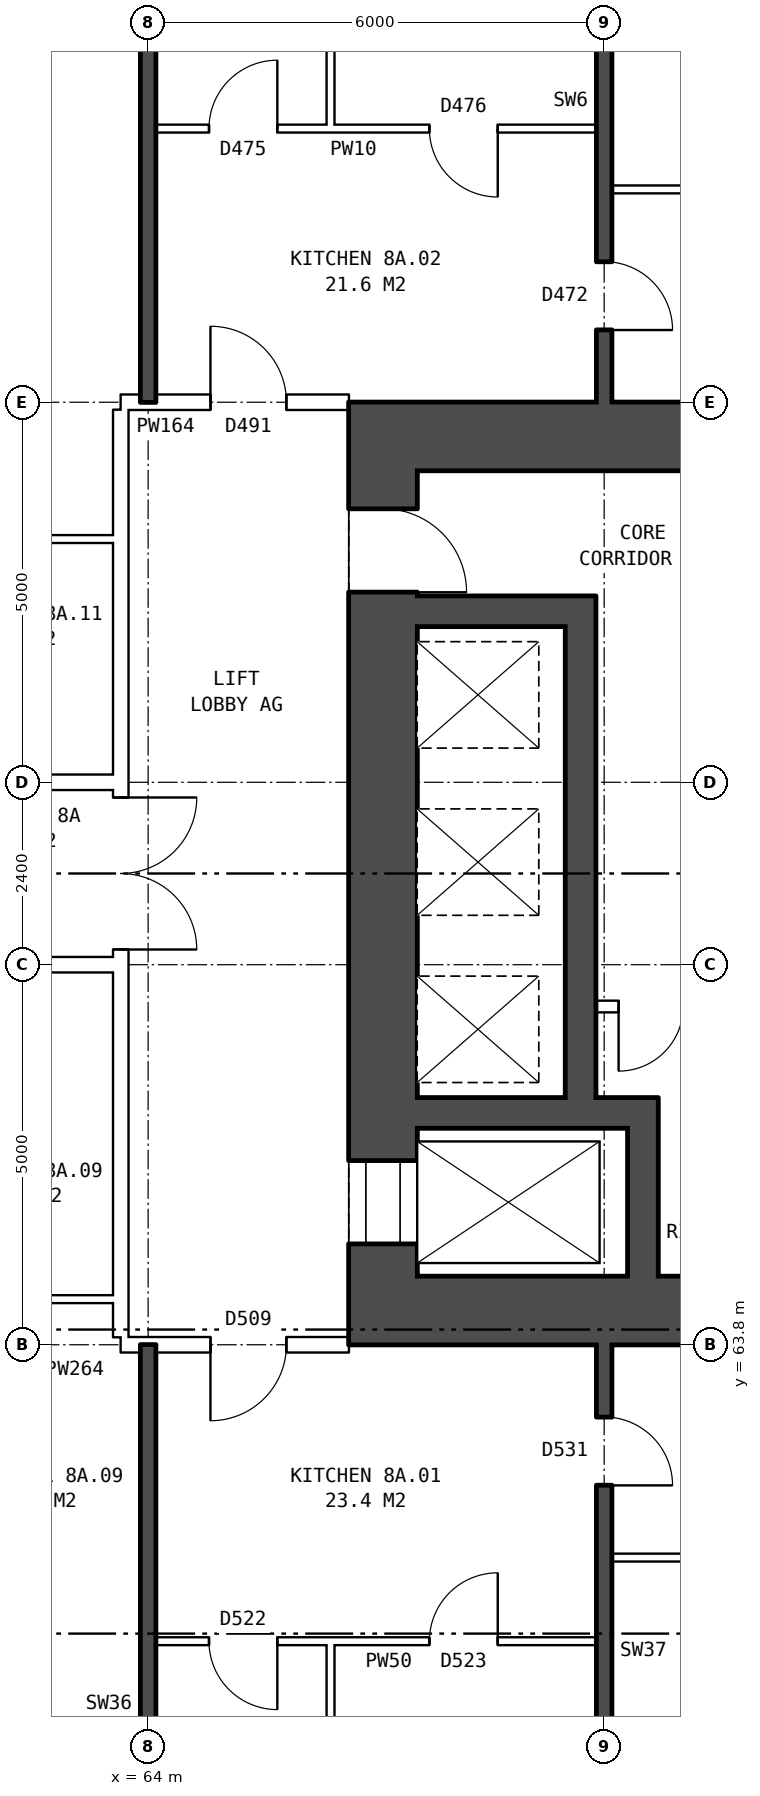
"""IFC4 building model, lengths in metres.
Left out: names, types, materials, properties, quantities, classifications, styles, units other than length and angle.
Written with IfcOpenShell. Run it as: python <this file> out.ifc"""

import sys

from ifc_helpers import new_model, si_unit, direction, frame, frame_2d, origin, place, context, subcontext, project, spatial, rectangle, extrude, element, fill, save


model = new_model("IFC4")
c1 = context("Model", 3, precision=1e-05, world=origin(), true_north=direction((0.0, 1.0)))
c2 = subcontext(c1, "Body", "Model", "MODEL_VIEW")
j1 = project(units=[si_unit("LENGTHUNIT", "METRE"), si_unit("PLANEANGLEUNIT", "RADIAN")], contexts=[c1])
p1 = place(None, origin())
s1 = spatial("IfcSite", under=j1, at=p1, CompositionType="ELEMENT")
p2 = place(p1, origin())
s2 = spatial("IfcBuilding", under=s1, at=p2, CompositionType="ELEMENT")
p3 = place(p2, frame((0.0, 0.0, 31.9)))
s3 = spatial("IfcBuildingStorey", under=s2, at=p3, CompositionType="ELEMENT", Elevation=31.9)
p4 = place(p3, frame((67.09, 64.7, 0.0), z_axis=(0.0, 0.0, 1.0), x_axis=(0.0, 1.0, 0.0)))
e1 = element("IfcWall", 1, at=p4, inside=s3, PredefinedType="SHEAR", context=c2, shape_type="SweptSolid", body=[
    extrude(rectangle(XDim=10.6, YDim=0.9, at=frame_2d((5.3, 0.0))), origin(), (0.0, 0.0, 1.0), 2.85),
])
p5 = place(p4, frame((0.425, 0.0, 0.0)))
e2 = element("IfcOpeningElement", 2, at=p5, cuts=e1, PredefinedType="OPENING", context=c2, shape_type="SweptSolid", body=[
    extrude(rectangle(XDim=1.1, YDim=2.1, at=frame_2d((0.55, 1.05))), frame((0.0, 0.46, 0.0), z_axis=(0.0, -1.0, 0.0), x_axis=(1.0, 0.0, 0.0)), (0.0, 0.0, 1.0), 0.92),
])
p6 = place(p4, frame((9.0, 0.0, 0.0)))
e3 = element("IfcOpeningElement", 3, at=p6, cuts=e1, PredefinedType="OPENING", context=c2, shape_type="SweptSolid", body=[
    extrude(rectangle(XDim=1.1, YDim=2.1, at=frame_2d((0.55, 1.05))), frame((0.0, 0.46, 0.0), z_axis=(0.0, -1.0, 0.0), x_axis=(1.0, 0.0, 0.0)), (0.0, 0.0, 1.0), 0.92),
])
for number, where, z_axis, x_axis in (
    (4, (66.64, 64.25, 0.0), (0.0, 0.0, 1.0), (1.0, 0.0, 0.0)),
    (5, (66.64, 75.75, 0.0), (0.0, 0.0, 1.0), (1.0, 0.0, 0.0)),
):
    element("IfcWall", number, at=place(p3, frame(where, z_axis=z_axis, x_axis=x_axis)), inside=s3, PredefinedType="SHEAR", context=c2, shape_type="SweptSolid", body=[
        extrude(rectangle(XDim=9.0, YDim=0.9, at=frame_2d((4.5, 0.0))), origin(), (0.0, 0.0, 1.0), 2.85),
    ])
p7 = place(p3, frame((67.54, 66.85, 0.0), z_axis=(0.0, 0.0, 1.0), x_axis=(1.0, 0.0, 0.0)))
e6 = element("IfcWall", 6, at=p7, inside=s3, PredefinedType="SHEAR", context=c2, shape_type="SweptSolid", body=[
    extrude(rectangle(XDim=3.17, YDim=0.4, at=frame_2d((1.585, 0.0))), origin(), (0.0, 0.0, 1.0), 2.85),
])
p8 = place(p3, frame((69.89, 68.25, 0.0), z_axis=(0.0, 0.0, 1.0), x_axis=(1.0, 0.0, 0.0)))
e7 = element("IfcWall", 7, at=p8, inside=s3, PredefinedType="PARTITIONING", context=c2, shape_type="SweptSolid", body=[
    extrude(rectangle(XDim=1.45, YDim=0.15, at=frame_2d((0.725, 0.0))), origin(), (0.0, 0.0, 1.0), 2.85),
])
p9 = place(p8, frame((0.3, 0.0, 0.0)))
e8 = element("IfcOpeningElement", 8, at=p9, cuts=e7, PredefinedType="OPENING", context=c2, shape_type="SweptSolid", body=[
    extrude(rectangle(XDim=0.85, YDim=2.1, at=frame_2d((0.425, 1.05))), frame((0.0, 0.085, 0.0), z_axis=(0.0, -1.0, 0.0), x_axis=(1.0, 0.0, 0.0)), (0.0, 0.0, 1.0), 0.17),
])
p10 = place(p3, frame((67.54, 73.45, 0.0), z_axis=(0.0, 0.0, 1.0), x_axis=(1.0, 0.0, 0.0)))
e9 = element("IfcWall", 9, at=p10, inside=s3, PredefinedType="SHEAR", context=c2, shape_type="SweptSolid", body=[
    extrude(rectangle(XDim=1.95, YDim=0.4, at=frame_2d((0.975, 0.0))), origin(), (0.0, 0.0, 1.0), 2.85),
])
p11 = place(p3, frame((69.69, 67.05, 0.0), z_axis=(0.0, 0.0, 1.0), x_axis=(0.0, 1.0, 0.0)))
e10 = element("IfcWall", 10, at=p11, inside=s3, PredefinedType="SHEAR", context=c2, shape_type="SweptSolid", body=[
    extrude(rectangle(XDim=6.6, YDim=0.4, at=frame_2d((3.3, 0.0))), origin(), (0.0, 0.0, 1.0), 2.85),
])
p12 = place(p3, frame((70.51, 64.7, 0.0), z_axis=(0.0, 0.0, 1.0), x_axis=(0.0, 1.0, 0.0)))
e11 = element("IfcWall", 11, at=p12, inside=s3, PredefinedType="SHEAR", context=c2, shape_type="SweptSolid", body=[
    extrude(rectangle(XDim=1.95, YDim=0.4, at=frame_2d((0.975, 0.0))), origin(), (0.0, 0.0, 1.0), 2.85),
])
p13 = place(p3, frame((63.64, 63.9, 0.0), z_axis=(0.0, 0.0, 1.0), x_axis=(0.0, 1.0, 0.0)))
e12 = element("IfcWall", 12, at=p13, inside=s3, PredefinedType="PARTITIONING", context=c2, shape_type="SweptSolid", body=[
    extrude(rectangle(XDim=12.2, YDim=0.2, at=frame_2d((6.1, 0.0))), origin(), (0.0, 0.0, 1.0), 2.85),
])
p14 = place(p13, frame((5.1, 0.0, 0.0)))
e13 = element("IfcOpeningElement", 13, at=p14, cuts=e12, PredefinedType="OPENING", context=c2, shape_type="SweptSolid", body=[
    extrude(rectangle(XDim=2.0, YDim=2.1, at=frame_2d((1.0, 1.05))), frame((0.0, 0.11, 0.0), z_axis=(0.0, -1.0, 0.0), x_axis=(1.0, 0.0, 0.0)), (0.0, 0.0, 1.0), 0.22),
])
p15 = place(p3, frame((64.1, 59.9, 0.0), z_axis=(0.0, 0.0, 1.0), x_axis=(1.0, 0.0, 0.0)))
e14 = element("IfcWall", 14, at=p15, inside=s3, PredefinedType="PARTITIONING", context=c2, shape_type="SweptSolid", body=[
    extrude(rectangle(XDim=5.8, YDim=0.1, at=frame_2d((2.9, 0.0))), origin(), (0.0, 0.0, 1.0), 2.85),
])
p16 = place(p15, frame((3.6, 0.0, 0.0)))
e15 = element("IfcOpeningElement", 15, at=p16, cuts=e14, PredefinedType="OPENING", context=c2, shape_type="SweptSolid", body=[
    extrude(rectangle(XDim=0.9, YDim=2.1, at=frame_2d((0.45, 1.05))), frame((0.0, 0.06, 0.0), z_axis=(0.0, -1.0, 0.0), x_axis=(1.0, 0.0, 0.0)), (0.0, 0.0, 1.0), 0.12),
])
p17 = place(p15, frame((0.7, 0.0, 0.0)))
e16 = element("IfcOpeningElement", 16, at=p17, cuts=e14, PredefinedType="OPENING", context=c2, shape_type="SweptSolid", body=[
    extrude(rectangle(XDim=0.9, YDim=2.1, at=frame_2d((0.45, 1.05))), frame((0.0, 0.06, 0.0), z_axis=(0.0, -1.0, 0.0), x_axis=(1.0, 0.0, 0.0)), (0.0, 0.0, 1.0), 0.12),
])
p18 = place(p3, frame((70.1, 61.0, 0.0), z_axis=(0.0, 0.0, 1.0), x_axis=(1.0, 0.0, 0.0)))
e17 = element("IfcWall", 17, at=p18, inside=s3, PredefinedType="PARTITIONING", context=c2, shape_type="SweptSolid", body=[
    extrude(rectangle(XDim=5.54, YDim=0.1, at=frame_2d((2.77, 0.0))), origin(), (0.0, 0.0, 1.0), 2.85),
])
p19 = place(p3, frame((63.64, 63.8, 0.0), z_axis=(0.0, 0.0, 1.0), x_axis=(1.0, 0.0, 0.0)))
e18 = element("IfcWall", 18, at=p19, inside=s3, PredefinedType="PARTITIONING", context=c2, shape_type="SweptSolid", body=[
    extrude(rectangle(XDim=3.0, YDim=0.2, at=frame_2d((1.5, 0.0))), origin(), (0.0, 0.0, 1.0), 2.85),
])
p20 = place(p19, frame((1.18, 0.0, 0.0)))
e19 = element("IfcOpeningElement", 19, at=p20, cuts=e18, PredefinedType="OPENING", context=c2, shape_type="SweptSolid", body=[
    extrude(rectangle(XDim=1.0, YDim=2.1, at=frame_2d((0.5, 1.05))), frame((0.0, 0.11, 0.0), z_axis=(0.0, -1.0, 0.0), x_axis=(1.0, 0.0, 0.0)), (0.0, 0.0, 1.0), 0.22),
])
p21 = place(p3, frame((61.0, 64.4, 0.0), z_axis=(0.0, 0.0, 1.0), x_axis=(1.0, 0.0, 0.0)))
e20 = element("IfcWall", 20, at=p21, inside=s3, PredefinedType="PARTITIONING", context=c2, shape_type="SweptSolid", body=[
    extrude(rectangle(XDim=2.64, YDim=0.1, at=frame_2d((1.32, 0.0))), origin(), (0.0, 0.0, 1.0), 2.85),
])
p22 = place(p3, frame((44.36, 68.8, 0.0), z_axis=(0.0, 0.0, 1.0), x_axis=(1.0, 0.0, 0.0)))
e21 = element("IfcWall", 21, at=p22, inside=s3, PredefinedType="PARTITIONING", context=c2, shape_type="SweptSolid", body=[
    extrude(rectangle(XDim=19.28, YDim=0.2, at=frame_2d((9.64, 0.0))), origin(), (0.0, 0.0, 1.0), 2.85),
])
p23 = place(p22, frame((14.64, 0.0, 0.0)))
e22 = element("IfcOpeningElement", 22, at=p23, cuts=e21, PredefinedType="OPENING", context=c2, shape_type="SweptSolid", body=[
    extrude(rectangle(XDim=1.0, YDim=2.1, at=frame_2d((0.5, 1.05))), frame((0.0, 0.11, 0.0), z_axis=(0.0, -1.0, 0.0), x_axis=(1.0, 0.0, 0.0)), (0.0, 0.0, 1.0), 0.22),
])
p24 = place(p22, frame((5.64, 0.0, 0.0)))
e23 = element("IfcOpeningElement", 23, at=p24, cuts=e21, PredefinedType="OPENING", context=c2, shape_type="SweptSolid", body=[
    extrude(rectangle(XDim=1.0, YDim=2.1, at=frame_2d((0.5, 1.05))), frame((0.0, 0.11, 0.0), z_axis=(0.0, -1.0, 0.0), x_axis=(1.0, 0.0, 0.0)), (0.0, 0.0, 1.0), 0.22),
])
p25 = place(p3, frame((44.36, 71.2, 0.0), z_axis=(0.0, 0.0, 1.0), x_axis=(1.0, 0.0, 0.0)))
e24 = element("IfcWall", 24, at=p25, inside=s3, PredefinedType="PARTITIONING", context=c2, shape_type="SweptSolid", body=[
    extrude(rectangle(XDim=19.28, YDim=0.2, at=frame_2d((9.64, 0.0))), origin(), (0.0, 0.0, 1.0), 2.85),
])
p26 = place(p25, frame((14.64, 0.0, 0.0)))
e25 = element("IfcOpeningElement", 25, at=p26, cuts=e24, PredefinedType="OPENING", context=c2, shape_type="SweptSolid", body=[
    extrude(rectangle(XDim=1.0, YDim=2.1, at=frame_2d((0.5, 1.05))), frame((0.0, 0.11, 0.0), z_axis=(0.0, -1.0, 0.0), x_axis=(1.0, 0.0, 0.0)), (0.0, 0.0, 1.0), 0.22),
])
p27 = place(p25, frame((5.64, 0.0, 0.0)))
e26 = element("IfcOpeningElement", 26, at=p27, cuts=e24, PredefinedType="OPENING", context=c2, shape_type="SweptSolid", body=[
    extrude(rectangle(XDim=1.0, YDim=2.1, at=frame_2d((0.5, 1.05))), frame((0.0, 0.11, 0.0), z_axis=(0.0, -1.0, 0.0), x_axis=(1.0, 0.0, 0.0)), (0.0, 0.0, 1.0), 0.22),
])
p28 = place(p3, frame((61.0, 74.4, 0.0), z_axis=(0.0, 0.0, 1.0), x_axis=(1.0, 0.0, 0.0)))
e27 = element("IfcWall", 27, at=p28, inside=s3, PredefinedType="PARTITIONING", context=c2, shape_type="SweptSolid", body=[
    extrude(rectangle(XDim=2.64, YDim=0.1, at=frame_2d((1.32, 0.0))), origin(), (0.0, 0.0, 1.0), 2.85),
])
p29 = place(p3, frame((63.64, 76.2, 0.0), z_axis=(0.0, 0.0, 1.0), x_axis=(1.0, 0.0, 0.0)))
e28 = element("IfcWall", 28, at=p29, inside=s3, PredefinedType="PARTITIONING", context=c2, shape_type="SweptSolid", body=[
    extrude(rectangle(XDim=3.0, YDim=0.2, at=frame_2d((1.5, 0.0))), origin(), (0.0, 0.0, 1.0), 2.85),
])
p30 = place(p29, frame((1.18, 0.0, 0.0)))
e29 = element("IfcOpeningElement", 29, at=p30, cuts=e28, PredefinedType="OPENING", context=c2, shape_type="SweptSolid", body=[
    extrude(rectangle(XDim=1.0, YDim=2.1, at=frame_2d((0.5, 1.05))), frame((0.0, 0.11, 0.0), z_axis=(0.0, -1.0, 0.0), x_axis=(1.0, 0.0, 0.0)), (0.0, 0.0, 1.0), 0.22),
])
p31 = place(p3, frame((70.1, 79.0, 0.0), z_axis=(0.0, 0.0, 1.0), x_axis=(1.0, 0.0, 0.0)))
e30 = element("IfcWall", 30, at=p31, inside=s3, PredefinedType="PARTITIONING", context=c2, shape_type="SweptSolid", body=[
    extrude(rectangle(XDim=5.54, YDim=0.1, at=frame_2d((2.77, 0.0))), origin(), (0.0, 0.0, 1.0), 2.85),
])
p32 = place(p3, frame((64.1, 79.8, 0.0), z_axis=(0.0, 0.0, 1.0), x_axis=(1.0, 0.0, 0.0)))
e31 = element("IfcWall", 31, at=p32, inside=s3, PredefinedType="PARTITIONING", context=c2, shape_type="SweptSolid", body=[
    extrude(rectangle(XDim=5.8, YDim=0.1, at=frame_2d((2.9, 0.0))), origin(), (0.0, 0.0, 1.0), 2.85),
])
p33 = place(p32, frame((3.6, 0.0, 0.0)))
e32 = element("IfcOpeningElement", 32, at=p33, cuts=e31, PredefinedType="OPENING", context=c2, shape_type="SweptSolid", body=[
    extrude(rectangle(XDim=0.9, YDim=2.1, at=frame_2d((0.45, 1.05))), frame((0.0, 0.06, 0.0), z_axis=(0.0, -1.0, 0.0), x_axis=(1.0, 0.0, 0.0)), (0.0, 0.0, 1.0), 0.12),
])
p34 = place(p32, frame((0.7, 0.0, 0.0)))
e33 = element("IfcOpeningElement", 33, at=p34, cuts=e31, PredefinedType="OPENING", context=c2, shape_type="SweptSolid", body=[
    extrude(rectangle(XDim=0.9, YDim=2.1, at=frame_2d((0.45, 1.05))), frame((0.0, 0.06, 0.0), z_axis=(0.0, -1.0, 0.0), x_axis=(1.0, 0.0, 0.0)), (0.0, 0.0, 1.0), 0.12),
])
for number, where, z_axis, x_axis in (
    (34, (64.0, 54.36, 0.0), (0.0, 0.0, 1.0), (0.0, 1.0, 0.0)),
    (35, (64.0, 76.2, 0.0), (0.0, 0.0, 1.0), (0.0, 1.0, 0.0)),
):
    element("IfcWall", number, at=place(p3, frame(where, z_axis=z_axis, x_axis=x_axis)), inside=s3, PredefinedType="SOLIDWALL", context=c2, shape_type="SweptSolid", body=[
        extrude(rectangle(XDim=9.44, YDim=0.2, at=frame_2d((4.72, 0.0))), origin(), (0.0, 0.0, 1.0), 2.85),
    ])
p35 = place(p3, frame((66.4, 57.45, 0.0), z_axis=(0.0, 0.0, 1.0), x_axis=(0.0, 1.0, 0.0)))
e36 = element("IfcWall", 36, at=p35, inside=s3, PredefinedType="PARTITIONING", context=c2, shape_type="SweptSolid", body=[
    extrude(rectangle(XDim=2.4, YDim=0.1, at=frame_2d((1.2, 0.0))), origin(), (0.0, 0.0, 1.0), 2.85),
])
p36 = place(p3, frame((66.4, 79.85, 0.0), z_axis=(0.0, 0.0, 1.0), x_axis=(0.0, 1.0, 0.0)))
e37 = element("IfcWall", 37, at=p36, inside=s3, PredefinedType="PARTITIONING", context=c2, shape_type="SweptSolid", body=[
    extrude(rectangle(XDim=2.3, YDim=0.1, at=frame_2d((1.15, 0.0))), origin(), (0.0, 0.0, 1.0), 2.85),
])
p37 = place(p3, frame((70.0, 54.36, 0.0), z_axis=(0.0, 0.0, 1.0), x_axis=(0.0, 1.0, 0.0)))
e38 = element("IfcWall", 38, at=p37, inside=s3, PredefinedType="SOLIDWALL", context=c2, shape_type="SweptSolid", body=[
    extrude(rectangle(XDim=9.44, YDim=0.2, at=frame_2d((4.72, 0.0))), origin(), (0.0, 0.0, 1.0), 2.85),
])
p38 = place(p37, frame((2.32, 0.0, 0.0)))
e39 = element("IfcOpeningElement", 39, at=p38, cuts=e38, PredefinedType="OPENING", context=c2, shape_type="SweptSolid", body=[
    extrude(rectangle(XDim=0.9, YDim=2.1, at=frame_2d((0.45, 1.05))), frame((0.0, 0.11, 0.0), z_axis=(0.0, -1.0, 0.0), x_axis=(1.0, 0.0, 0.0)), (0.0, 0.0, 1.0), 0.22),
])
p39 = place(p37, frame((7.59, 0.0, 0.0)))
e40 = element("IfcOpeningElement", 40, at=p39, cuts=e38, PredefinedType="OPENING", context=c2, shape_type="SweptSolid", body=[
    extrude(rectangle(XDim=0.9, YDim=2.1, at=frame_2d((0.45, 1.05))), frame((0.0, 0.11, 0.0), z_axis=(0.0, -1.0, 0.0), x_axis=(1.0, 0.0, 0.0)), (0.0, 0.0, 1.0), 0.22),
])
p40 = place(p3, frame((70.0, 76.2, 0.0), z_axis=(0.0, 0.0, 1.0), x_axis=(0.0, 1.0, 0.0)))
e41 = element("IfcWall", 41, at=p40, inside=s3, PredefinedType="SOLIDWALL", context=c2, shape_type="SweptSolid", body=[
    extrude(rectangle(XDim=9.44, YDim=0.2, at=frame_2d((4.72, 0.0))), origin(), (0.0, 0.0, 1.0), 2.85),
])
p41 = place(p40, frame((6.07, 0.0, 0.0)))
e42 = element("IfcOpeningElement", 42, at=p41, cuts=e41, PredefinedType="OPENING", context=c2, shape_type="SweptSolid", body=[
    extrude(rectangle(XDim=0.9, YDim=2.1, at=frame_2d((0.45, 1.05))), frame((0.0, 0.11, 0.0), z_axis=(0.0, -1.0, 0.0), x_axis=(1.0, 0.0, 0.0)), (0.0, 0.0, 1.0), 0.22),
])
p42 = place(p40, frame((0.95, 0.0, 0.0)))
e43 = element("IfcOpeningElement", 43, at=p42, cuts=e41, PredefinedType="OPENING", context=c2, shape_type="SweptSolid", body=[
    extrude(rectangle(XDim=0.9, YDim=2.1, at=frame_2d((0.45, 1.05))), frame((0.0, 0.11, 0.0), z_axis=(0.0, -1.0, 0.0), x_axis=(1.0, 0.0, 0.0)), (0.0, 0.0, 1.0), 0.22),
])
p43 = place(p5, origin())
e44 = element("IfcDoor", 44, at=p43, inside=s3, OperationType="DOUBLE_DOOR_SLIDING", PredefinedType="DOOR", context=c2, shape_type="SweptSolid", body=[
    extrude(rectangle(XDim=1.1, YDim=2.1, at=frame_2d((0.55, 1.05))), frame((0.0, -0.385, 0.0), z_axis=(0.0, -1.0, 0.0), x_axis=(1.0, 0.0, 0.0)), (0.0, 0.0, 1.0), 0.05),
])
fill(e2, e44)
p44 = place(p6, frame((1.1, 0.0, 0.0), z_axis=(0.0, 0.0, 1.0), x_axis=(-1.0, 0.0, 0.0)))
e45 = element("IfcDoor", 45, at=p44, inside=s3, OperationType="SINGLE_SWING_RIGHT", PredefinedType="DOOR", context=c2, shape_type="SweptSolid", body=[
    extrude(rectangle(XDim=1.1, YDim=2.1, at=frame_2d((0.55, 1.05))), frame((0.0, 0.435, 0.0), z_axis=(0.0, -1.0, 0.0), x_axis=(1.0, 0.0, 0.0)), (0.0, 0.0, 1.0), 0.05),
])
fill(e3, e45)
p45 = place(p9, frame((0.85, 0.0, 0.0), z_axis=(0.0, 0.0, 1.0), x_axis=(-1.0, 0.0, 0.0)))
e46 = element("IfcDoor", 46, at=p45, inside=s3, OperationType="SINGLE_SWING_RIGHT", PredefinedType="DOOR", context=c2, shape_type="SweptSolid", body=[
    extrude(rectangle(XDim=0.85, YDim=2.1, at=frame_2d((0.425, 1.05))), frame((0.0, 0.025, 0.0), z_axis=(0.0, -1.0, 0.0), x_axis=(1.0, 0.0, 0.0)), (0.0, 0.0, 1.0), 0.05),
])
fill(e8, e46)
p46 = place(p14, frame((2.0, 0.0, 0.0), z_axis=(0.0, 0.0, 1.0), x_axis=(-1.0, 0.0, 0.0)))
e47 = element("IfcDoor", 47, at=p46, inside=s3, OperationType="DOUBLE_DOOR_SINGLE_SWING", PredefinedType="DOOR", context=c2, shape_type="SweptSolid", body=[
    extrude(rectangle(XDim=2.0, YDim=2.1, at=frame_2d((1.0, 1.05))), frame((0.0, 0.025, 0.0), z_axis=(0.0, -1.0, 0.0), x_axis=(1.0, 0.0, 0.0)), (0.0, 0.0, 1.0), 0.05),
])
fill(e13, e47)
p47 = place(p39, frame((0.9, 0.0, 0.0), z_axis=(0.0, 0.0, 1.0), x_axis=(-1.0, 0.0, 0.0)))
e48 = element("IfcDoor", 48, at=p47, inside=s3, OperationType="SINGLE_SWING_RIGHT", PredefinedType="DOOR", context=c2, shape_type="SweptSolid", body=[
    extrude(rectangle(XDim=0.9, YDim=2.1, at=frame_2d((0.45, 1.05))), frame((0.0, 0.025, 0.0), z_axis=(0.0, -1.0, 0.0), x_axis=(1.0, 0.0, 0.0)), (0.0, 0.0, 1.0), 0.05),
])
fill(e40, e48)
p48 = place(p20, frame((1.0, 0.0, 0.0), z_axis=(0.0, 0.0, 1.0), x_axis=(-1.0, 0.0, 0.0)))
e49 = element("IfcDoor", 49, at=p48, inside=s3, OperationType="SINGLE_SWING_RIGHT", PredefinedType="DOOR", context=c2, shape_type="SweptSolid", body=[
    extrude(rectangle(XDim=1.0, YDim=2.1, at=frame_2d((0.5, 1.05))), frame((0.0, 0.025, 0.0), z_axis=(0.0, -1.0, 0.0), x_axis=(1.0, 0.0, 0.0)), (0.0, 0.0, 1.0), 0.05),
])
fill(e19, e49)
p49 = place(p16, origin())
e50 = element("IfcDoor", 50, at=p49, inside=s3, OperationType="SINGLE_SWING_RIGHT", PredefinedType="DOOR", context=c2, shape_type="SweptSolid", body=[
    extrude(rectangle(XDim=0.9, YDim=2.1, at=frame_2d((0.45, 1.05))), frame((0.0, 0.025, 0.0), z_axis=(0.0, -1.0, 0.0), x_axis=(1.0, 0.0, 0.0)), (0.0, 0.0, 1.0), 0.05),
])
fill(e15, e50)
p50 = place(p17, frame((0.9, 0.0, 0.0), z_axis=(0.0, 0.0, 1.0), x_axis=(-1.0, 0.0, 0.0)))
e51 = element("IfcDoor", 51, at=p50, inside=s3, OperationType="SINGLE_SWING_LEFT", PredefinedType="DOOR", context=c2, shape_type="SweptSolid", body=[
    extrude(rectangle(XDim=0.9, YDim=2.1, at=frame_2d((0.45, 1.05))), frame((0.0, 0.025, 0.0), z_axis=(0.0, -1.0, 0.0), x_axis=(1.0, 0.0, 0.0)), (0.0, 0.0, 1.0), 0.05),
])
fill(e16, e51)
p51 = place(p42, frame((0.9, 0.0, 0.0), z_axis=(0.0, 0.0, 1.0), x_axis=(-1.0, 0.0, 0.0)))
e52 = element("IfcDoor", 52, at=p51, inside=s3, OperationType="SINGLE_SWING_RIGHT", PredefinedType="DOOR", context=c2, shape_type="SweptSolid", body=[
    extrude(rectangle(XDim=0.9, YDim=2.1, at=frame_2d((0.45, 1.05))), frame((0.0, 0.025, 0.0), z_axis=(0.0, -1.0, 0.0), x_axis=(1.0, 0.0, 0.0)), (0.0, 0.0, 1.0), 0.05),
])
fill(e43, e52)
p52 = place(p30, origin())
e53 = element("IfcDoor", 53, at=p52, inside=s3, OperationType="SINGLE_SWING_LEFT", PredefinedType="DOOR", context=c2, shape_type="SweptSolid", body=[
    extrude(rectangle(XDim=1.0, YDim=2.1, at=frame_2d((0.5, 1.05))), frame((0.0, 0.025, 0.0), z_axis=(0.0, -1.0, 0.0), x_axis=(1.0, 0.0, 0.0)), (0.0, 0.0, 1.0), 0.05),
])
fill(e29, e53)
p53 = place(p33, frame((0.9, 0.0, 0.0), z_axis=(0.0, 0.0, 1.0), x_axis=(-1.0, 0.0, 0.0)))
e54 = element("IfcDoor", 54, at=p53, inside=s3, OperationType="SINGLE_SWING_LEFT", PredefinedType="DOOR", context=c2, shape_type="SweptSolid", body=[
    extrude(rectangle(XDim=0.9, YDim=2.1, at=frame_2d((0.45, 1.05))), frame((0.0, 0.025, 0.0), z_axis=(0.0, -1.0, 0.0), x_axis=(1.0, 0.0, 0.0)), (0.0, 0.0, 1.0), 0.05),
])
fill(e32, e54)
p54 = place(p34, origin())
e55 = element("IfcDoor", 55, at=p54, inside=s3, OperationType="SINGLE_SWING_RIGHT", PredefinedType="DOOR", context=c2, shape_type="SweptSolid", body=[
    extrude(rectangle(XDim=0.9, YDim=2.1, at=frame_2d((0.45, 1.05))), frame((0.0, 0.025, 0.0), z_axis=(0.0, -1.0, 0.0), x_axis=(1.0, 0.0, 0.0)), (0.0, 0.0, 1.0), 0.05),
])
fill(e33, e55)
save(model, sys.argv[1])
